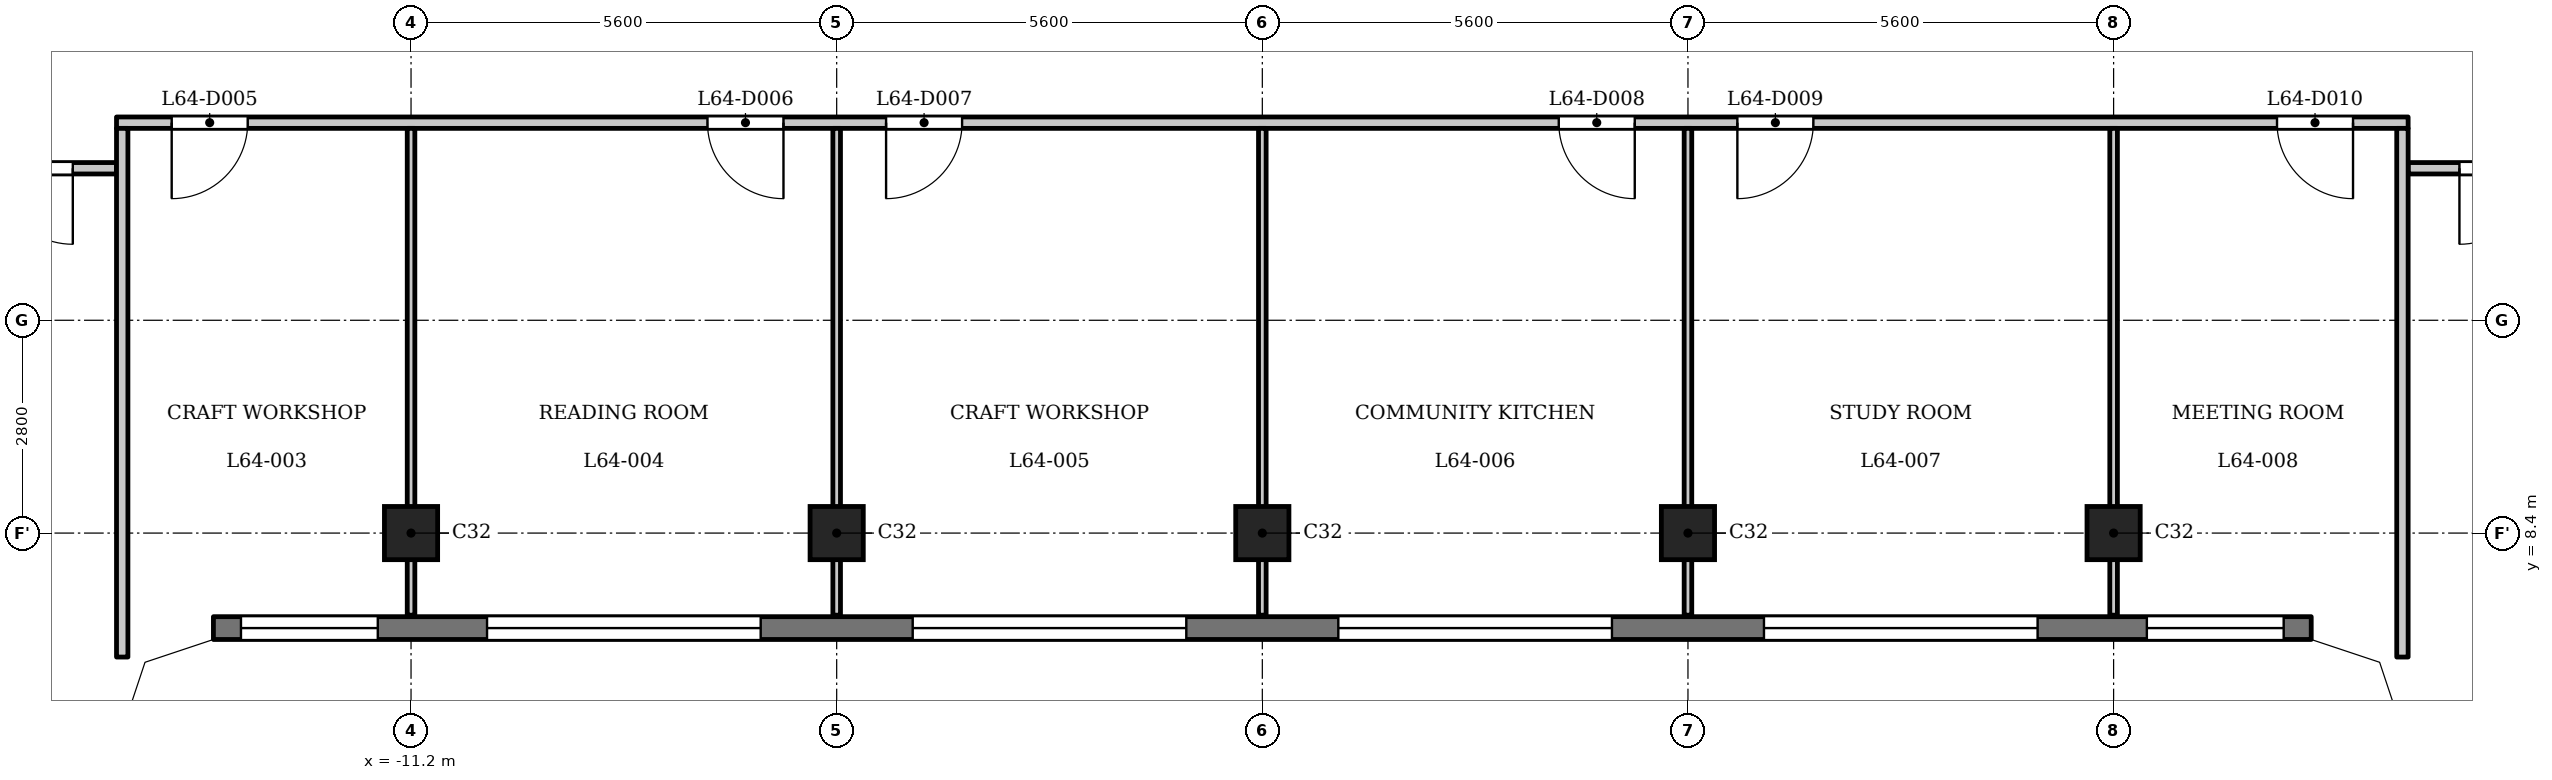
"""IFC4 building model, lengths in metres.
Left out: names, types, materials, properties, quantities, classifications, styles, units other than length and angle.
Written with IfcOpenShell. Run it as: python <this file> out.ifc"""

import sys

from ifc_helpers import new_model, si_unit, direction, frame, frame_2d, origin, origin_2d, place, context, subcontext, project, spatial, polyline, rectangle, outline, extrude, element, fill, save


model = new_model("IFC4")
c1 = context("Model", 3, precision=1e-05, world=origin(), true_north=direction((0.0, 1.0)))
c2 = subcontext(c1, "Body", "Model", "MODEL_VIEW")
j1 = project(units=[si_unit("LENGTHUNIT", "METRE"), si_unit("PLANEANGLEUNIT", "RADIAN")], contexts=[c1])
p1 = place(None, origin())
s1 = spatial("IfcSite", under=j1, at=p1, CompositionType="ELEMENT")
p2 = place(p1, origin())
s2 = spatial("IfcBuilding", under=s1, at=p2, CompositionType="ELEMENT")
p3 = place(p2, frame((0.0, 0.0, 248.7)))
s3 = spatial("IfcBuildingStorey", under=s2, at=p3, CompositionType="ELEMENT", Elevation=248.7)
for number, where, z_axis, x_axis in (
    (1, (-11.2, 8.4, 0.0), (0.0, 0.0, 1.0), (1.0, 0.0, 0.0)),
    (2, (-5.6, 8.4, 0.0), (0.0, 0.0, 1.0), (1.0, 0.0, 0.0)),
    (3, (0.0, 8.4, 0.0), (0.0, 0.0, 1.0), (1.0, 0.0, 0.0)),
    (4, (5.6, 8.4, 0.0), (0.0, 0.0, 1.0), (1.0, 0.0, 0.0)),
    (5, (11.2, 8.4, 0.0), (0.0, 0.0, 1.0), (1.0, 0.0, 0.0)),
):
    element("IfcColumn", number, at=place(p3, frame(where, z_axis=z_axis, x_axis=x_axis)), inside=s3, PredefinedType="COLUMN", context=c2, shape_type="SweptSolid", body=[
        extrude(rectangle(XDim=0.7, YDim=0.7, at=origin_2d()), origin(), (0.0, 0.0, 1.0), 3.5),
    ])
p4 = place(p3, frame((-13.8, 7.15, 0.0), z_axis=(0.0, 0.0, 1.0), x_axis=(1.0, 0.0, 0.0)))
e6 = element("IfcWall", 6, at=p4, inside=s3, PredefinedType="SOLIDWALL", context=c2, shape_type="SweptSolid", body=[
    extrude(rectangle(XDim=27.6, YDim=0.3, at=frame_2d((13.8, 0.0))), origin(), (0.0, 0.0, 1.0), 3.2),
])
p5 = place(p4, frame((0.363, 0.0, 0.9)))
e7 = element("IfcOpeningElement", 7, at=p5, cuts=e6, PredefinedType="OPENING", context=c2, shape_type="SweptSolid", body=[
    extrude(rectangle(XDim=1.8, YDim=1.25, at=frame_2d((0.9, 0.625))), frame((0.0, 0.16, 0.0), z_axis=(0.0, -1.0, 0.0), x_axis=(1.0, 0.0, 0.0)), (0.0, 0.0, 1.0), 0.32),
])
p6 = place(p4, frame((3.6, 0.0, 1.2)))
e8 = element("IfcOpeningElement", 8, at=p6, cuts=e6, PredefinedType="OPENING", context=c2, shape_type="SweptSolid", body=[
    extrude(rectangle(XDim=3.6, YDim=0.95, at=frame_2d((1.8, 0.475))), frame((0.0, 0.16, 0.0), z_axis=(0.0, -1.0, 0.0), x_axis=(1.0, 0.0, 0.0)), (0.0, 0.0, 1.0), 0.32),
])
p7 = place(p4, frame((9.2, 0.0, 1.2)))
e9 = element("IfcOpeningElement", 9, at=p7, cuts=e6, PredefinedType="OPENING", context=c2, shape_type="SweptSolid", body=[
    extrude(rectangle(XDim=3.6, YDim=0.95, at=frame_2d((1.8, 0.475))), frame((0.0, 0.16, 0.0), z_axis=(0.0, -1.0, 0.0), x_axis=(1.0, 0.0, 0.0)), (0.0, 0.0, 1.0), 0.32),
])
p8 = place(p4, frame((14.8, 0.0, 1.2)))
e10 = element("IfcOpeningElement", 10, at=p8, cuts=e6, PredefinedType="OPENING", context=c2, shape_type="SweptSolid", body=[
    extrude(rectangle(XDim=3.6, YDim=0.95, at=frame_2d((1.8, 0.475))), frame((0.0, 0.16, 0.0), z_axis=(0.0, -1.0, 0.0), x_axis=(1.0, 0.0, 0.0)), (0.0, 0.0, 1.0), 0.32),
])
p9 = place(p4, frame((20.4, 0.0, 1.2)))
e11 = element("IfcOpeningElement", 11, at=p9, cuts=e6, PredefinedType="OPENING", context=c2, shape_type="SweptSolid", body=[
    extrude(rectangle(XDim=3.6, YDim=0.95, at=frame_2d((1.8, 0.475))), frame((0.0, 0.16, 0.0), z_axis=(0.0, -1.0, 0.0), x_axis=(1.0, 0.0, 0.0)), (0.0, 0.0, 1.0), 0.32),
])
p10 = place(p4, frame((25.438, 0.0, 0.9)))
e12 = element("IfcOpeningElement", 12, at=p10, cuts=e6, PredefinedType="OPENING", context=c2, shape_type="SweptSolid", body=[
    extrude(rectangle(XDim=1.8, YDim=1.25, at=frame_2d((0.9, 0.625))), frame((0.0, 0.16, 0.0), z_axis=(0.0, -1.0, 0.0), x_axis=(1.0, 0.0, 0.0)), (0.0, 0.0, 1.0), 0.32),
])
p11 = place(p3, frame((-17.4, 13.2, 0.0), z_axis=(0.0, 0.0, 1.0), x_axis=(1.0, 0.0, 0.0)))
e13 = element("IfcWall", 13, at=p11, inside=s3, PredefinedType="PARTITIONING", context=c2, shape_type="SweptSolid", body=[
    extrude(rectangle(XDim=2.325, YDim=0.15, at=frame_2d((1.163, 0.0))), origin(), (0.0, 0.0, 1.0), 3.2),
])
p12 = place(p11, frame((0.75, 0.0, 0.0)))
e14 = element("IfcOpeningElement", 14, at=p12, cuts=e13, PredefinedType="OPENING", context=c2, shape_type="SweptSolid", body=[
    extrude(rectangle(XDim=1.0, YDim=2.1, at=frame_2d((0.5, 1.05))), frame((0.0, 0.085, 0.0), z_axis=(0.0, -1.0, 0.0), x_axis=(1.0, 0.0, 0.0)), (0.0, 0.0, 1.0), 0.17),
])
p13 = place(p3, frame((15.075, 13.2, 0.0), z_axis=(0.0, 0.0, 1.0), x_axis=(1.0, 0.0, 0.0)))
e15 = element("IfcWall", 15, at=p13, inside=s3, PredefinedType="PARTITIONING", context=c2, shape_type="SweptSolid", body=[
    extrude(rectangle(XDim=2.325, YDim=0.15, at=frame_2d((1.163, 0.0))), origin(), (0.0, 0.0, 1.0), 3.2),
])
p14 = place(p13, frame((0.675, 0.0, 0.0)))
e16 = element("IfcOpeningElement", 16, at=p14, cuts=e15, PredefinedType="OPENING", context=c2, shape_type="SweptSolid", body=[
    extrude(rectangle(XDim=1.0, YDim=2.1, at=frame_2d((0.5, 1.05))), frame((0.0, 0.085, 0.0), z_axis=(0.0, -1.0, 0.0), x_axis=(1.0, 0.0, 0.0)), (0.0, 0.0, 1.0), 0.17),
])
p15 = place(p3, frame((-15.075, 13.8, 0.0), z_axis=(0.0, 0.0, 1.0), x_axis=(1.0, 0.0, 0.0)))
e17 = element("IfcWall", 17, at=p15, inside=s3, PredefinedType="PARTITIONING", context=c2, shape_type="SweptSolid", body=[
    extrude(rectangle(XDim=30.15, YDim=0.15, at=frame_2d((15.075, 0.0))), origin(), (0.0, 0.0, 1.0), 3.2),
])
p16 = place(p15, frame((0.726, 0.0, 0.0)))
e18 = element("IfcOpeningElement", 18, at=p16, cuts=e17, PredefinedType="OPENING", context=c2, shape_type="SweptSolid", body=[
    extrude(rectangle(XDim=1.0, YDim=2.1, at=frame_2d((0.5, 1.05))), frame((0.0, 0.085, 0.0), z_axis=(0.0, -1.0, 0.0), x_axis=(1.0, 0.0, 0.0)), (0.0, 0.0, 1.0), 0.17),
])
p17 = place(p15, frame((7.775, 0.0, 0.0)))
e19 = element("IfcOpeningElement", 19, at=p17, cuts=e17, PredefinedType="OPENING", context=c2, shape_type="SweptSolid", body=[
    extrude(rectangle(XDim=1.0, YDim=2.1, at=frame_2d((0.5, 1.05))), frame((0.0, 0.085, 0.0), z_axis=(0.0, -1.0, 0.0), x_axis=(1.0, 0.0, 0.0)), (0.0, 0.0, 1.0), 0.17),
])
p18 = place(p15, frame((10.125, 0.0, 0.0)))
e20 = element("IfcOpeningElement", 20, at=p18, cuts=e17, PredefinedType="OPENING", context=c2, shape_type="SweptSolid", body=[
    extrude(rectangle(XDim=1.0, YDim=2.1, at=frame_2d((0.5, 1.05))), frame((0.0, 0.085, 0.0), z_axis=(0.0, -1.0, 0.0), x_axis=(1.0, 0.0, 0.0)), (0.0, 0.0, 1.0), 0.17),
])
p19 = place(p15, frame((18.975, 0.0, 0.0)))
e21 = element("IfcOpeningElement", 21, at=p19, cuts=e17, PredefinedType="OPENING", context=c2, shape_type="SweptSolid", body=[
    extrude(rectangle(XDim=1.0, YDim=2.1, at=frame_2d((0.5, 1.05))), frame((0.0, 0.085, 0.0), z_axis=(0.0, -1.0, 0.0), x_axis=(1.0, 0.0, 0.0)), (0.0, 0.0, 1.0), 0.17),
])
p20 = place(p15, frame((21.325, 0.0, 0.0)))
e22 = element("IfcOpeningElement", 22, at=p20, cuts=e17, PredefinedType="OPENING", context=c2, shape_type="SweptSolid", body=[
    extrude(rectangle(XDim=1.0, YDim=2.1, at=frame_2d((0.5, 1.05))), frame((0.0, 0.085, 0.0), z_axis=(0.0, -1.0, 0.0), x_axis=(1.0, 0.0, 0.0)), (0.0, 0.0, 1.0), 0.17),
])
p21 = place(p15, frame((28.425, 0.0, 0.0)))
e23 = element("IfcOpeningElement", 23, at=p21, cuts=e17, PredefinedType="OPENING", context=c2, shape_type="SweptSolid", body=[
    extrude(rectangle(XDim=1.0, YDim=2.1, at=frame_2d((0.5, 1.05))), frame((0.0, 0.085, 0.0), z_axis=(0.0, -1.0, 0.0), x_axis=(1.0, 0.0, 0.0)), (0.0, 0.0, 1.0), 0.17),
])
p22 = place(p3, frame((-15.0, 6.769, 0.0), z_axis=(0.0, 0.0, 1.0), x_axis=(0.0, 1.0, 0.0)))
e24 = element("IfcWall", 24, at=p22, inside=s3, PredefinedType="PARTITIONING", context=c2, shape_type="SweptSolid", body=[
    extrude(rectangle(XDim=6.956, YDim=0.15, at=frame_2d((3.478, 0.0))), origin(), (0.0, 0.0, 1.0), 3.2),
])
for number, where, z_axis, x_axis in (
    (25, (-11.2, 7.32, 0.0), (0.0, 0.0, 1.0), (0.0, 1.0, 0.0)),
    (26, (-5.6, 7.32, 0.0), (0.0, 0.0, 1.0), (0.0, 1.0, 0.0)),
    (27, (0.0, 7.32, 0.0), (0.0, 0.0, 1.0), (0.0, 1.0, 0.0)),
    (28, (5.6, 7.32, 0.0), (0.0, 0.0, 1.0), (0.0, 1.0, 0.0)),
    (29, (11.2, 7.32, 0.0), (0.0, 0.0, 1.0), (0.0, 1.0, 0.0)),
):
    element("IfcWall", number, at=place(p3, frame(where, z_axis=z_axis, x_axis=x_axis)), inside=s3, PredefinedType="PARTITIONING", context=c2, shape_type="SweptSolid", body=[
        extrude(rectangle(XDim=6.405, YDim=0.1, at=frame_2d((3.203, 0.0))), origin(), (0.0, 0.0, 1.0), 3.2),
    ])
p23 = place(p3, frame((15.0, 6.769, 0.0), z_axis=(0.0, 0.0, 1.0), x_axis=(0.0, 1.0, 0.0)))
e30 = element("IfcWall", 30, at=p23, inside=s3, PredefinedType="PARTITIONING", context=c2, shape_type="SweptSolid", body=[
    extrude(rectangle(XDim=6.956, YDim=0.15, at=frame_2d((3.478, 0.0))), origin(), (0.0, 0.0, 1.0), 3.2),
])
p24 = place(p3, origin())
e31 = element("IfcWall", 31, at=p24, inside=s3, PredefinedType="SOLIDWALL", context=c2, shape_type="SweptSolid", body=[
    extrude(outline(polyline([(-13.849, 7.3), (-14.937, 6.937), (-15.3, 5.849), (-15.3, 5.8), (-15.0, 5.8), (-14.7, 6.7), (-13.8, 7.0), (-13.8, 7.3), (-13.849, 7.3)])), origin(), (0.0, 0.0, 1.0), 3.2),
])
e32 = element("IfcWall", 32, at=p24, inside=s3, PredefinedType="SOLIDWALL", context=c2, shape_type="SweptSolid", body=[
    extrude(outline(polyline([(14.937, 6.937), (13.849, 7.3), (13.8, 7.3), (13.8, 7.0), (14.7, 6.7), (15.0, 5.8), (15.3, 5.8), (15.3, 5.849), (14.937, 6.937)])), origin(), (0.0, 0.0, 1.0), 3.2),
])
p25 = place(p12, origin())
e33 = element("IfcDoor", 33, at=p25, inside=s3, OperationType="SINGLE_SWING_RIGHT", PredefinedType="DOOR", context=c2, shape_type="SweptSolid", body=[
    extrude(rectangle(XDim=1.0, YDim=2.1, at=frame_2d((0.5, 1.05))), frame((0.0, 0.025, 0.0), z_axis=(0.0, -1.0, 0.0), x_axis=(1.0, 0.0, 0.0)), (0.0, 0.0, 1.0), 0.05),
])
fill(e14, e33)
p26 = place(p14, origin())
e34 = element("IfcDoor", 34, at=p26, inside=s3, OperationType="SINGLE_SWING_LEFT", PredefinedType="DOOR", context=c2, shape_type="SweptSolid", body=[
    extrude(rectangle(XDim=1.0, YDim=2.1, at=frame_2d((0.5, 1.05))), frame((0.0, 0.025, 0.0), z_axis=(0.0, -1.0, 0.0), x_axis=(1.0, 0.0, 0.0)), (0.0, 0.0, 1.0), 0.05),
])
fill(e16, e34)
p27 = place(p16, origin())
e35 = element("IfcDoor", 35, at=p27, inside=s3, OperationType="SINGLE_SWING_LEFT", PredefinedType="DOOR", context=c2, shape_type="SweptSolid", body=[
    extrude(rectangle(XDim=1.0, YDim=2.1, at=frame_2d((0.5, 1.05))), frame((0.0, 0.025, 0.0), z_axis=(0.0, -1.0, 0.0), x_axis=(1.0, 0.0, 0.0)), (0.0, 0.0, 1.0), 0.05),
])
fill(e18, e35)
p28 = place(p17, origin())
e36 = element("IfcDoor", 36, at=p28, inside=s3, OperationType="SINGLE_SWING_RIGHT", PredefinedType="DOOR", context=c2, shape_type="SweptSolid", body=[
    extrude(rectangle(XDim=1.0, YDim=2.1, at=frame_2d((0.5, 1.05))), frame((0.0, 0.025, 0.0), z_axis=(0.0, -1.0, 0.0), x_axis=(1.0, 0.0, 0.0)), (0.0, 0.0, 1.0), 0.05),
])
fill(e19, e36)
p29 = place(p18, origin())
e37 = element("IfcDoor", 37, at=p29, inside=s3, OperationType="SINGLE_SWING_LEFT", PredefinedType="DOOR", context=c2, shape_type="SweptSolid", body=[
    extrude(rectangle(XDim=1.0, YDim=2.1, at=frame_2d((0.5, 1.05))), frame((0.0, 0.025, 0.0), z_axis=(0.0, -1.0, 0.0), x_axis=(1.0, 0.0, 0.0)), (0.0, 0.0, 1.0), 0.05),
])
fill(e20, e37)
p30 = place(p19, origin())
e38 = element("IfcDoor", 38, at=p30, inside=s3, OperationType="SINGLE_SWING_RIGHT", PredefinedType="DOOR", context=c2, shape_type="SweptSolid", body=[
    extrude(rectangle(XDim=1.0, YDim=2.1, at=frame_2d((0.5, 1.05))), frame((0.0, 0.025, 0.0), z_axis=(0.0, -1.0, 0.0), x_axis=(1.0, 0.0, 0.0)), (0.0, 0.0, 1.0), 0.05),
])
fill(e21, e38)
p31 = place(p20, origin())
e39 = element("IfcDoor", 39, at=p31, inside=s3, OperationType="SINGLE_SWING_LEFT", PredefinedType="DOOR", context=c2, shape_type="SweptSolid", body=[
    extrude(rectangle(XDim=1.0, YDim=2.1, at=frame_2d((0.5, 1.05))), frame((0.0, 0.025, 0.0), z_axis=(0.0, -1.0, 0.0), x_axis=(1.0, 0.0, 0.0)), (0.0, 0.0, 1.0), 0.05),
])
fill(e22, e39)
p32 = place(p21, origin())
e40 = element("IfcDoor", 40, at=p32, inside=s3, OperationType="SINGLE_SWING_RIGHT", PredefinedType="DOOR", context=c2, shape_type="SweptSolid", body=[
    extrude(rectangle(XDim=1.0, YDim=2.1, at=frame_2d((0.5, 1.05))), frame((0.0, 0.025, 0.0), z_axis=(0.0, -1.0, 0.0), x_axis=(1.0, 0.0, 0.0)), (0.0, 0.0, 1.0), 0.05),
])
fill(e23, e40)
p33 = place(p5, origin())
e41 = element("IfcWindow", 41, at=p33, inside=s3, PartitioningType="SINGLE_PANEL", PredefinedType="WINDOW", context=c2, shape_type="SweptSolid", body=[
    extrude(rectangle(XDim=1.8, YDim=1.25, at=frame_2d((0.9, 0.625))), frame((0.0, 0.03, 0.0), z_axis=(0.0, -1.0, 0.0), x_axis=(1.0, 0.0, 0.0)), (0.0, 0.0, 1.0), 0.06),
])
fill(e7, e41)
p34 = place(p6, origin())
e42 = element("IfcWindow", 42, at=p34, inside=s3, PartitioningType="SINGLE_PANEL", PredefinedType="WINDOW", context=c2, shape_type="SweptSolid", body=[
    extrude(rectangle(XDim=3.6, YDim=0.95, at=frame_2d((1.8, 0.475))), frame((0.0, 0.03, 0.0), z_axis=(0.0, -1.0, 0.0), x_axis=(1.0, 0.0, 0.0)), (0.0, 0.0, 1.0), 0.06),
])
fill(e8, e42)
p35 = place(p7, origin())
e43 = element("IfcWindow", 43, at=p35, inside=s3, PartitioningType="SINGLE_PANEL", PredefinedType="WINDOW", context=c2, shape_type="SweptSolid", body=[
    extrude(rectangle(XDim=3.6, YDim=0.95, at=frame_2d((1.8, 0.475))), frame((0.0, 0.03, 0.0), z_axis=(0.0, -1.0, 0.0), x_axis=(1.0, 0.0, 0.0)), (0.0, 0.0, 1.0), 0.06),
])
fill(e9, e43)
p36 = place(p8, origin())
e44 = element("IfcWindow", 44, at=p36, inside=s3, PartitioningType="SINGLE_PANEL", PredefinedType="WINDOW", context=c2, shape_type="SweptSolid", body=[
    extrude(rectangle(XDim=3.6, YDim=0.95, at=frame_2d((1.8, 0.475))), frame((0.0, 0.03, 0.0), z_axis=(0.0, -1.0, 0.0), x_axis=(1.0, 0.0, 0.0)), (0.0, 0.0, 1.0), 0.06),
])
fill(e10, e44)
p37 = place(p9, origin())
e45 = element("IfcWindow", 45, at=p37, inside=s3, PartitioningType="SINGLE_PANEL", PredefinedType="WINDOW", context=c2, shape_type="SweptSolid", body=[
    extrude(rectangle(XDim=3.6, YDim=0.95, at=frame_2d((1.8, 0.475))), frame((0.0, 0.03, 0.0), z_axis=(0.0, -1.0, 0.0), x_axis=(1.0, 0.0, 0.0)), (0.0, 0.0, 1.0), 0.06),
])
fill(e11, e45)
p38 = place(p10, origin())
e46 = element("IfcWindow", 46, at=p38, inside=s3, PartitioningType="SINGLE_PANEL", PredefinedType="WINDOW", context=c2, shape_type="SweptSolid", body=[
    extrude(rectangle(XDim=1.8, YDim=1.25, at=frame_2d((0.9, 0.625))), frame((0.0, 0.03, 0.0), z_axis=(0.0, -1.0, 0.0), x_axis=(1.0, 0.0, 0.0)), (0.0, 0.0, 1.0), 0.06),
])
fill(e12, e46)
save(model, sys.argv[1])
